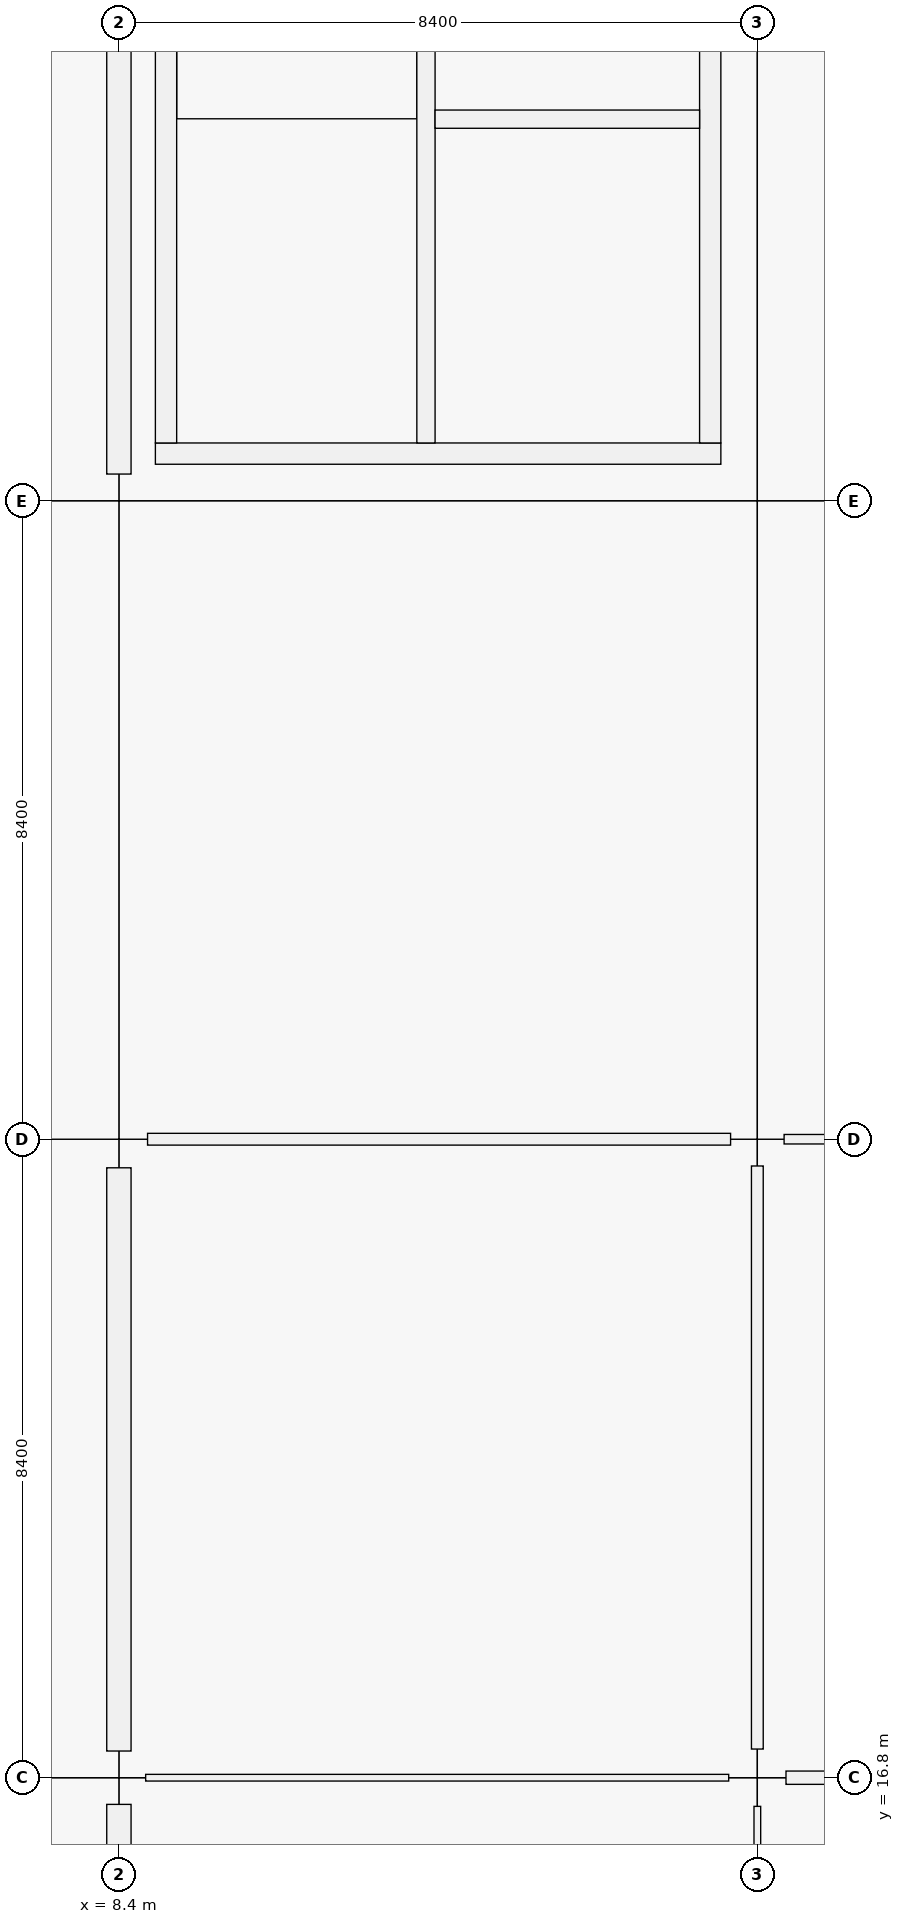
"""IFC4 building model, lengths in metres.
Left out: names, types, materials, properties, quantities, classifications, styles, units other than length and angle.
Written with IfcOpenShell. Run it as: python <this file> out.ifc"""

import sys

from ifc_helpers import new_model, si_unit, direction, frame, frame_2d, origin, origin_2d, place, context, subcontext, project, spatial, rectangle, extrude, element, fill, save


model = new_model("IFC4")
c1 = context("Model", 3, precision=1e-05, world=origin(), true_north=direction((0.0, 1.0)))
c2 = subcontext(c1, "Body", "Model", "MODEL_VIEW")
j1 = project(units=[si_unit("LENGTHUNIT", "METRE"), si_unit("PLANEANGLEUNIT", "RADIAN")], contexts=[c1])
p1 = place(None, origin())
s1 = spatial("IfcSite", under=j1, at=p1, CompositionType="ELEMENT")
p2 = place(p1, origin())
s2 = spatial("IfcBuilding", under=s1, at=p2, CompositionType="ELEMENT")
p3 = place(p2, frame((0.0, 0.0, 10.26)))
s3 = spatial("IfcBuildingStorey", under=s2, at=p3, CompositionType="ELEMENT", Elevation=10.26)
p4 = place(p3, frame((8.4, 16.8, 0.0), z_axis=(0.0, 0.0, 1.0), x_axis=(1.0, 0.0, 0.0)))
e1 = element("IfcColumn", 1, at=p4, inside=s3, PredefinedType="COLUMN", context=c2, shape_type="SweptSolid", body=[
    extrude(rectangle(XDim=0.7, YDim=0.7, at=origin_2d()), origin(), (0.0, 0.0, 1.0), 4.5),
])
p5 = place(p3, frame((8.4, 25.2, 0.0), z_axis=(0.0, 0.0, 1.0), x_axis=(1.0, 0.0, 0.0)))
e2 = element("IfcColumn", 2, at=p5, inside=s3, PredefinedType="COLUMN", context=c2, shape_type="SweptSolid", body=[
    extrude(rectangle(XDim=0.75, YDim=0.75, at=origin_2d()), origin(), (0.0, 0.0, 1.0), 4.5),
])
p6 = place(p3, frame((8.4, 33.6, 0.0), z_axis=(0.0, 0.0, 1.0), x_axis=(1.0, 0.0, 0.0)))
e3 = element("IfcColumn", 3, at=p6, inside=s3, PredefinedType="COLUMN", context=c2, shape_type="SweptSolid", body=[
    extrude(rectangle(XDim=0.7, YDim=0.7, at=origin_2d()), origin(), (0.0, 0.0, 1.0), 4.5),
])
p7 = place(p3, frame((16.8, 16.8, 0.0), z_axis=(0.0, 0.0, 1.0), x_axis=(1.0, 0.0, 0.0)))
e4 = element("IfcColumn", 4, at=p7, inside=s3, PredefinedType="COLUMN", context=c2, shape_type="SweptSolid", body=[
    extrude(rectangle(XDim=0.75, YDim=0.75, at=origin_2d()), origin(), (0.0, 0.0, 1.0), 4.5),
])
p8 = place(p3, frame((16.8, 25.2, 0.0), z_axis=(0.0, 0.0, 1.0), x_axis=(1.0, 0.0, 0.0)))
e5 = element("IfcColumn", 5, at=p8, inside=s3, PredefinedType="COLUMN", context=c2, shape_type="SweptSolid", body=[
    extrude(rectangle(XDim=0.7, YDim=0.7, at=origin_2d()), origin(), (0.0, 0.0, 1.0), 4.5),
])
p9 = place(p3, frame((16.8, 33.6, 0.0), z_axis=(0.0, 0.0, 1.0), x_axis=(1.0, 0.0, 0.0)))
e6 = element("IfcColumn", 6, at=p9, inside=s3, PredefinedType="COLUMN", context=c2, shape_type="SweptSolid", body=[
    extrude(rectangle(XDim=0.75, YDim=0.75, at=origin_2d()), origin(), (0.0, 0.0, 1.0), 4.5),
])
p10 = place(p3, frame((8.4, 8.676, 0.0), z_axis=(0.0, 0.0, 1.0), x_axis=(0.0, 1.0, 0.0)))
e7 = element("IfcWall", 7, at=p10, inside=s3, PredefinedType="SOLIDWALL", context=c2, shape_type="SweptSolid", body=[
    extrude(rectangle(XDim=7.773, YDim=0.32, at=frame_2d((3.886, 0.0))), origin(), (0.0, 0.0, 1.0), 3.54),
])
p11 = place(p10, frame((2.861, 0.0, 0.9)))
e8 = element("IfcOpeningElement", 8, at=p11, cuts=e7, PredefinedType="OPENING", context=c2, shape_type="SweptSolid", body=[
    extrude(rectangle(XDim=2.05, YDim=1.45, at=frame_2d((1.025, 0.725))), frame((0.0, 0.16, 0.0), z_axis=(0.0, -1.0, 0.0), x_axis=(1.0, 0.0, 0.0)), (0.0, 0.0, 1.0), 0.32),
])
p12 = place(p3, frame((8.4, 17.151, 0.0), z_axis=(0.0, 0.0, 1.0), x_axis=(0.0, 1.0, 0.0)))
e9 = element("IfcWall", 9, at=p12, inside=s3, PredefinedType="SOLIDWALL", context=c2, shape_type="SweptSolid", body=[
    extrude(rectangle(XDim=7.673, YDim=0.32, at=frame_2d((3.836, 0.0))), origin(), (0.0, 0.0, 1.0), 3.54),
])
p13 = place(p12, frame((2.611, 0.0, 0.9)))
e10 = element("IfcOpeningElement", 10, at=p13, cuts=e9, PredefinedType="OPENING", context=c2, shape_type="SweptSolid", body=[
    extrude(rectangle(XDim=2.45, YDim=1.45, at=frame_2d((1.225, 0.725))), frame((0.0, 0.16, 0.0), z_axis=(0.0, -1.0, 0.0), x_axis=(1.0, 0.0, 0.0)), (0.0, 0.0, 1.0), 0.32),
])
p14 = place(p3, frame((8.4, 33.951, 0.0), z_axis=(0.0, 0.0, 1.0), x_axis=(0.0, 1.0, 0.0)))
e11 = element("IfcWall", 11, at=p14, inside=s3, PredefinedType="SOLIDWALL", context=c2, shape_type="SweptSolid", body=[
    extrude(rectangle(XDim=7.673, YDim=0.32, at=frame_2d((3.836, 0.0))), origin(), (0.0, 0.0, 1.0), 3.54),
])
p15 = place(p3, frame((16.32, 34.22, 0.0), z_axis=(0.0, 0.0, 1.0), x_axis=(-1.0, 0.0, 0.0)))
e12 = element("IfcWall", 12, at=p15, inside=s3, PredefinedType="SHEAR", context=c2, shape_type="SweptSolid", body=[
    extrude(rectangle(XDim=7.44, YDim=0.28, at=frame_2d((3.72, 0.0))), origin(), (0.0, 0.0, 1.0), 4.5),
])
p16 = place(p15, frame((1.28, 0.0, 0.0)))
e13 = element("IfcOpeningElement", 13, at=p16, cuts=e12, PredefinedType="OPENING", context=c2, shape_type="SweptSolid", body=[
    extrude(rectangle(XDim=1.5, YDim=2.15, at=frame_2d((0.75, 1.075))), frame((0.0, 0.14, 0.0), z_axis=(0.0, -1.0, 0.0), x_axis=(1.0, 0.0, 0.0)), (0.0, 0.0, 1.0), 0.28),
])
for number, where, z_axis, x_axis in (
    (14, (9.02, 34.36, 0.0), (0.0, 0.0, 1.0), (0.0, 1.0, 0.0)),
    (15, (16.18, 41.24, 0.0), (0.0, 0.0, 1.0), (0.0, -1.0, 0.0)),
):
    element("IfcWall", number, at=place(p3, frame(where, z_axis=z_axis, x_axis=x_axis)), inside=s3, PredefinedType="SHEAR", context=c2, shape_type="SweptSolid", body=[
        extrude(rectangle(XDim=6.88, YDim=0.28, at=frame_2d((3.44, 0.0))), origin(), (0.0, 0.0, 1.0), 4.5),
    ])
p17 = place(p3, frame((12.44, 34.36, 0.0), z_axis=(0.0, 0.0, 1.0), x_axis=(0.0, 1.0, 0.0)))
e16 = element("IfcWall", 16, at=p17, inside=s3, PredefinedType="SHEAR", context=c2, shape_type="SweptSolid", body=[
    extrude(rectangle(XDim=6.88, YDim=0.24, at=frame_2d((3.44, 0.0))), origin(), (0.0, 0.0, 1.0), 4.5),
])
p18 = place(p17, frame((0.12, 0.0, 0.0)))
e17 = element("IfcOpeningElement", 17, at=p18, cuts=e16, PredefinedType="OPENING", context=c2, shape_type="SweptSolid", body=[
    extrude(rectangle(XDim=1.0, YDim=2.15, at=frame_2d((0.5, 1.075))), frame((0.0, 0.12, 0.0), z_axis=(0.0, -1.0, 0.0), x_axis=(1.0, 0.0, 0.0)), (0.0, 0.0, 1.0), 0.24),
])
p19 = place(p3, frame((12.56, 38.62, 0.0), z_axis=(0.0, 0.0, 1.0), x_axis=(1.0, 0.0, 0.0)))
e18 = element("IfcWall", 18, at=p19, inside=s3, PredefinedType="SHEAR", context=c2, shape_type="SweptSolid", body=[
    extrude(rectangle(XDim=3.48, YDim=0.24, at=frame_2d((1.74, 0.0))), origin(), (0.0, 0.0, 1.0), 4.5),
])
p20 = place(p19, frame((1.19, 0.0, 0.0)))
e19 = element("IfcOpeningElement", 19, at=p20, cuts=e18, PredefinedType="OPENING", context=c2, shape_type="SweptSolid", body=[
    extrude(rectangle(XDim=1.1, YDim=2.15, at=frame_2d((0.55, 1.075))), frame((0.0, 0.12, 0.0), z_axis=(0.0, -1.0, 0.0), x_axis=(1.0, 0.0, 0.0)), (0.0, 0.0, 1.0), 0.24),
])
p21 = place(p3, frame((8.752, 16.8, 0.0), z_axis=(0.0, 0.0, 1.0), x_axis=(1.0, 0.0, 0.0)))
e20 = element("IfcWall", 20, at=p21, inside=s3, PredefinedType="PARTITIONING", context=c2, shape_type="SweptSolid", body=[
    extrude(rectangle(XDim=7.671, YDim=0.088, at=frame_2d((3.835, 0.0))), origin(), (0.0, 0.0, 1.0), 3.37),
])
p22 = place(p21, frame((3.351, 0.0, 0.0)))
e21 = element("IfcOpeningElement", 21, at=p22, cuts=e20, PredefinedType="OPENING", context=c2, shape_type="SweptSolid", body=[
    extrude(rectangle(XDim=0.97, YDim=2.12, at=frame_2d((0.485, 1.06))), frame((0.0, 0.044, 0.0), z_axis=(0.0, -1.0, 0.0), x_axis=(1.0, 0.0, 0.0)), (0.0, 0.0, 1.0), 0.088),
])
p23 = place(p3, frame((8.777, 25.2, 0.0), z_axis=(0.0, 0.0, 1.0), x_axis=(1.0, 0.0, 0.0)))
e22 = element("IfcWall", 22, at=p23, inside=s3, PredefinedType="PARTITIONING", context=c2, shape_type="SweptSolid", body=[
    extrude(rectangle(XDim=7.671, YDim=0.155, at=frame_2d((3.835, 0.0))), origin(), (0.0, 0.0, 1.0), 3.37),
])
p24 = place(p23, frame((3.371, 0.0, 0.0)))
e23 = element("IfcOpeningElement", 23, at=p24, cuts=e22, PredefinedType="OPENING", context=c2, shape_type="SweptSolid", body=[
    extrude(rectangle(XDim=0.93, YDim=2.12, at=frame_2d((0.465, 1.06))), frame((0.0, 0.078, 0.0), z_axis=(0.0, -1.0, 0.0), x_axis=(1.0, 0.0, 0.0)), (0.0, 0.0, 1.0), 0.155),
])
p25 = place(p3, frame((17.177, 16.8, 0.0), z_axis=(0.0, 0.0, 1.0), x_axis=(1.0, 0.0, 0.0)))
e24 = element("IfcWall", 24, at=p25, inside=s3, PredefinedType="PARTITIONING", context=c2, shape_type="SweptSolid", body=[
    extrude(rectangle(XDim=7.671, YDim=0.175, at=frame_2d((3.835, 0.0))), origin(), (0.0, 0.0, 1.0), 3.37),
])
p26 = place(p25, frame((3.371, 0.0, 0.0)))
e25 = element("IfcOpeningElement", 25, at=p26, cuts=e24, PredefinedType="OPENING", context=c2, shape_type="SweptSolid", body=[
    extrude(rectangle(XDim=0.93, YDim=2.12, at=frame_2d((0.465, 1.06))), frame((0.0, 0.087, 0.0), z_axis=(0.0, -1.0, 0.0), x_axis=(1.0, 0.0, 0.0)), (0.0, 0.0, 1.0), 0.175),
])
p27 = place(p3, frame((17.152, 25.2, 0.0), z_axis=(0.0, 0.0, 1.0), x_axis=(1.0, 0.0, 0.0)))
e26 = element("IfcWall", 26, at=p27, inside=s3, PredefinedType="PARTITIONING", context=c2, shape_type="SweptSolid", body=[
    extrude(rectangle(XDim=7.671, YDim=0.125, at=frame_2d((3.835, 0.0))), origin(), (0.0, 0.0, 1.0), 3.37),
])
p28 = place(p27, frame((3.306, 0.0, 0.0)))
e27 = element("IfcOpeningElement", 27, at=p28, cuts=e26, PredefinedType="OPENING", context=c2, shape_type="SweptSolid", body=[
    extrude(rectangle(XDim=1.06, YDim=2.25, at=frame_2d((0.53, 1.125))), frame((0.0, 0.062, 0.0), z_axis=(0.0, -1.0, 0.0), x_axis=(1.0, 0.0, 0.0)), (0.0, 0.0, 1.0), 0.125),
])
p29 = place(p3, frame((16.8, 8.677, 0.0), z_axis=(0.0, 0.0, 1.0), x_axis=(0.0, 1.0, 0.0)))
e28 = element("IfcWall", 28, at=p29, inside=s3, PredefinedType="PARTITIONING", context=c2, shape_type="SweptSolid", body=[
    extrude(rectangle(XDim=7.746, YDim=0.088, at=frame_2d((3.873, 0.0))), origin(), (0.0, 0.0, 1.0), 3.37),
])
p30 = place(p29, frame((3.353, 0.0, 0.0)))
e29 = element("IfcOpeningElement", 29, at=p30, cuts=e28, PredefinedType="OPENING", context=c2, shape_type="SweptSolid", body=[
    extrude(rectangle(XDim=1.04, YDim=2.2, at=frame_2d((0.52, 1.1))), frame((0.0, 0.044, 0.0), z_axis=(0.0, -1.0, 0.0), x_axis=(1.0, 0.0, 0.0)), (0.0, 0.0, 1.0), 0.088),
])
p31 = place(p3, frame((16.8, 17.177, 0.0), z_axis=(0.0, 0.0, 1.0), x_axis=(0.0, 1.0, 0.0)))
e30 = element("IfcWall", 30, at=p31, inside=s3, PredefinedType="PARTITIONING", context=c2, shape_type="SweptSolid", body=[
    extrude(rectangle(XDim=7.671, YDim=0.155, at=frame_2d((3.835, 0.0))), origin(), (0.0, 0.0, 1.0), 3.37),
])
p32 = place(p31, frame((3.325, 0.0, 0.0)))
e31 = element("IfcOpeningElement", 31, at=p32, cuts=e30, PredefinedType="OPENING", context=c2, shape_type="SweptSolid", body=[
    extrude(rectangle(XDim=1.02, YDim=2.2, at=frame_2d((0.51, 1.1))), frame((0.0, 0.078, 0.0), z_axis=(0.0, -1.0, 0.0), x_axis=(1.0, 0.0, 0.0)), (0.0, 0.0, 1.0), 0.155),
])
p33 = place(p13, origin())
e32 = element("IfcWindow", 32, at=p33, inside=s3, PartitioningType="SINGLE_PANEL", PredefinedType="WINDOW", context=c2, shape_type="SweptSolid", body=[
    extrude(rectangle(XDim=2.45, YDim=1.45, at=frame_2d((1.225, 0.725))), frame((0.0, 0.03, 0.0), z_axis=(0.0, -1.0, 0.0), x_axis=(1.0, 0.0, 0.0)), (0.0, 0.0, 1.0), 0.06),
])
fill(e10, e32)
p34 = place(p18, origin())
e33 = element("IfcDoor", 33, at=p34, inside=s3, OperationType="SINGLE_SWING_RIGHT", PredefinedType="DOOR", context=c2, shape_type="SweptSolid", body=[
    extrude(rectangle(XDim=1.0, YDim=2.15, at=frame_2d((0.5, 1.075))), frame((0.0, 0.025, 0.0), z_axis=(0.0, -1.0, 0.0), x_axis=(1.0, 0.0, 0.0)), (0.0, 0.0, 1.0), 0.05),
])
fill(e17, e33)
p35 = place(p16, origin())
e34 = element("IfcDoor", 34, at=p35, inside=s3, OperationType="DOUBLE_DOOR_SINGLE_SWING", PredefinedType="DOOR", context=c2, shape_type="SweptSolid", body=[
    extrude(rectangle(XDim=1.5, YDim=2.15, at=frame_2d((0.75, 1.075))), frame((0.0, 0.025, 0.0), z_axis=(0.0, -1.0, 0.0), x_axis=(1.0, 0.0, 0.0)), (0.0, 0.0, 1.0), 0.05),
])
fill(e13, e34)
p36 = place(p20, origin())
e35 = element("IfcDoor", 35, at=p36, inside=s3, OperationType="DOUBLE_DOOR_SLIDING", PredefinedType="DOOR", context=c2, shape_type="SweptSolid", body=[
    extrude(rectangle(XDim=1.1, YDim=2.15, at=frame_2d((0.55, 1.075))), frame((0.0, 0.025, 0.0), z_axis=(0.0, -1.0, 0.0), x_axis=(1.0, 0.0, 0.0)), (0.0, 0.0, 1.0), 0.05),
])
fill(e19, e35)
p37 = place(p24, origin())
e36 = element("IfcDoor", 36, at=p37, inside=s3, OperationType="SINGLE_SWING_RIGHT", PredefinedType="DOOR", context=c2, shape_type="SweptSolid", body=[
    extrude(rectangle(XDim=0.93, YDim=2.12, at=frame_2d((0.465, 1.06))), frame((0.0, 0.025, 0.0), z_axis=(0.0, -1.0, 0.0), x_axis=(1.0, 0.0, 0.0)), (0.0, 0.0, 1.0), 0.05),
])
fill(e23, e36)
p38 = place(p22, origin())
e37 = element("IfcDoor", 37, at=p38, inside=s3, OperationType="SINGLE_SWING_RIGHT", PredefinedType="DOOR", context=c2, shape_type="SweptSolid", body=[
    extrude(rectangle(XDim=0.97, YDim=2.12, at=frame_2d((0.485, 1.06))), frame((0.0, 0.025, 0.0), z_axis=(0.0, -1.0, 0.0), x_axis=(1.0, 0.0, 0.0)), (0.0, 0.0, 1.0), 0.05),
])
fill(e21, e37)
p39 = place(p32, origin())
e38 = element("IfcDoor", 38, at=p39, inside=s3, OperationType="SINGLE_SWING_LEFT", PredefinedType="DOOR", context=c2, shape_type="SweptSolid", body=[
    extrude(rectangle(XDim=1.02, YDim=2.2, at=frame_2d((0.51, 1.1))), frame((0.0, 0.025, 0.0), z_axis=(0.0, -1.0, 0.0), x_axis=(1.0, 0.0, 0.0)), (0.0, 0.0, 1.0), 0.05),
])
fill(e31, e38)
save(model, sys.argv[1])
